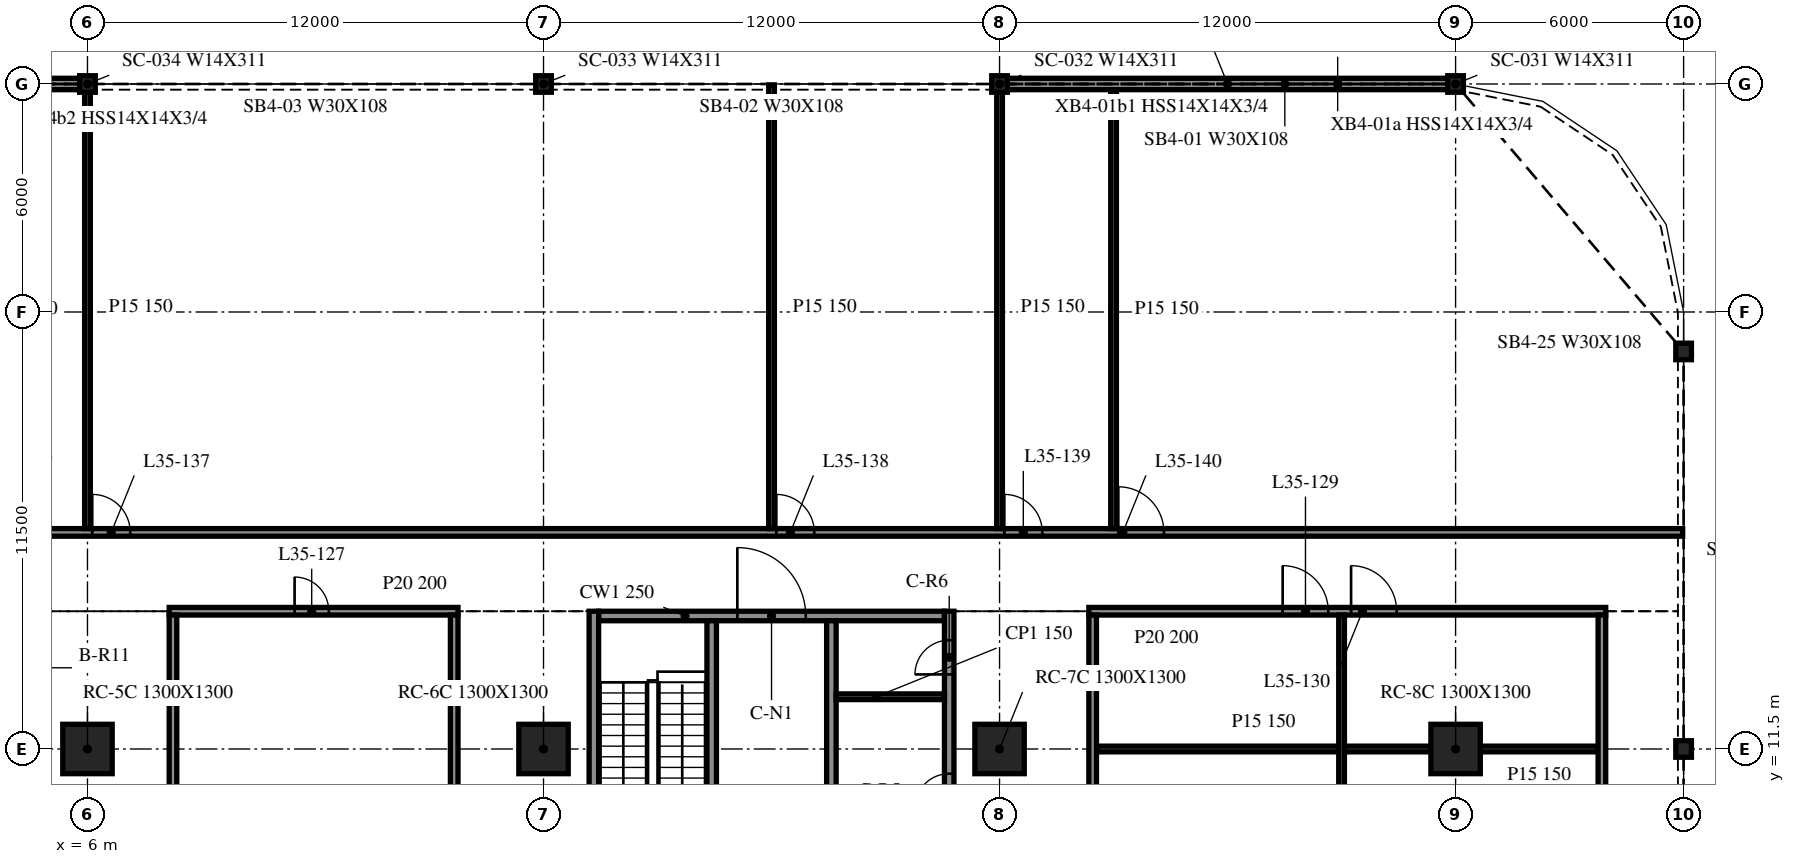
"""IFC4 building model, lengths in metres.
Left out: names, types, materials, properties, quantities, classifications, styles, units other than length and angle.
Written with IfcOpenShell. Run it as: python <this file> out.ifc"""

import sys

from ifc_helpers import new_model, si_unit, direction, frame, frame_2d, origin, origin_2d, place, context, subcontext, project, spatial, rectangle, i_section, extrude, element, fill, save


model = new_model("IFC4")
c1 = context("Model", 3, precision=1e-05, world=origin(), true_north=direction((0.0, 1.0)))
c2 = subcontext(c1, "Body", "Model", "MODEL_VIEW")
j1 = project(units=[si_unit("LENGTHUNIT", "METRE"), si_unit("PLANEANGLEUNIT", "RADIAN")], contexts=[c1])
p1 = place(None, origin())
s1 = spatial("IfcSite", under=j1, at=p1, CompositionType="ELEMENT")
p2 = place(p1, origin())
s2 = spatial("IfcBuilding", under=s1, at=p2, CompositionType="ELEMENT")
p3 = place(p2, frame((0.0, 0.0, 150.7)))
s3 = spatial("IfcBuildingStorey", under=s2, at=p3, CompositionType="ELEMENT", Elevation=150.7)
for number, where, z_axis, x_axis in (
    (1, (6.0, 11.5, -0.34), (0.0, 0.0, 1.0), (1.0, 0.0, 0.0)),
    (2, (18.0, 11.5, -0.34), (0.0, 0.0, 1.0), (1.0, 0.0, 0.0)),
    (3, (30.0, 11.5, -0.34), (0.0, 0.0, 1.0), (1.0, 0.0, 0.0)),
    (4, (42.0, 11.5, -0.34), (0.0, 0.0, 1.0), (1.0, 0.0, 0.0)),
):
    element("IfcColumn", number, at=place(p3, frame(where, z_axis=z_axis, x_axis=x_axis)), inside=s3, PredefinedType="COLUMN", context=c2, shape_type="SweptSolid", body=[
        extrude(rectangle(XDim=1.3, YDim=1.3, at=origin_2d()), origin(), (0.0, 0.0, 1.0), 3.89),
    ])
for number, where, z_axis, x_axis in (
    (5, (42.0, 29.0, -0.34), (0.0, 0.0, 1.0), (1.0, 0.0, 0.0)),
    (6, (30.0, 29.0, -0.34), (0.0, 0.0, 1.0), (1.0, 0.0, 0.0)),
    (7, (18.0, 29.0, -0.34), (0.0, 0.0, 1.0), (1.0, 0.0, 0.0)),
    (8, (6.0, 29.0, -0.34), (0.0, 0.0, 1.0), (1.0, 0.0, 0.0)),
    (9, (48.0, 11.5, -0.34), (0.0, 0.0, 1.0), (1.0, 0.0, 0.0)),
    (10, (48.0, 21.962, -0.34), (0.0, 0.0, 1.0), (1.0, 0.0, 0.0)),
):
    element("IfcColumn", number, at=place(p3, frame(where, z_axis=z_axis, x_axis=x_axis)), inside=s3, PredefinedType="COLUMN", context=c2, shape_type="SweptSolid", body=[
        extrude(i_section(OverallWidth=0.412, OverallDepth=0.434, WebThickness=0.036, FlangeThickness=0.057, at=origin_2d()), origin(), (0.0, 0.0, 1.0), 3.89),
    ])
for number, where, z_axis, x_axis in (
    (11, (41.982, 29.0, 0.0), (0.0, 0.0, 1.0), (-1.0, 0.0, 0.0)),
    (12, (5.982, 29.0, 0.0), (0.0, 0.0, 1.0), (-1.0, 0.0, 0.0)),
):
    element("IfcWall", number, at=place(p3, frame(where, z_axis=z_axis, x_axis=x_axis)), inside=s3, PredefinedType="NOTDEFINED", context=c2, shape_type="SweptSolid", body=[
        extrude(rectangle(XDim=11.964, YDim=0.3, at=frame_2d((5.982, 0.0))), origin(), (0.0, 0.0, 1.0), 3.55),
    ])
p4 = place(p3, frame((19.325, 15.125, 0.0), z_axis=(0.0, 0.0, 1.0), x_axis=(0.0, -1.0, 0.0)))
e13 = element("IfcWall", 13, at=p4, inside=s3, PredefinedType="SOLIDWALL", context=c2, shape_type="SweptSolid", body=[
    extrude(rectangle(XDim=24.25, YDim=0.25, at=frame_2d((12.125, 0.0))), origin(), (0.0, 0.0, 1.0), 3.55),
])
p5 = place(p3, frame((28.675, -9.125, 0.0), z_axis=(0.0, 0.0, 1.0), x_axis=(0.0, 1.0, 0.0)))
e14 = element("IfcWall", 14, at=p5, inside=s3, PredefinedType="SOLIDWALL", context=c2, shape_type="SweptSolid", body=[
    extrude(rectangle(XDim=24.25, YDim=0.25, at=frame_2d((12.125, 0.0))), origin(), (0.0, 0.0, 1.0), 3.55),
])
p6 = place(p5, frame((14.425, 0.0, 0.0)))
e15 = element("IfcOpeningElement", 15, at=p6, cuts=e14, PredefinedType="OPENING", context=c2, shape_type="SweptSolid", body=[
    extrude(rectangle(XDim=0.9, YDim=2.1, at=frame_2d((0.45, 1.05))), frame((0.0, 0.135, 0.0), z_axis=(0.0, -1.0, 0.0), x_axis=(1.0, 0.0, 0.0)), (0.0, 0.0, 1.0), 0.27),
])
p7 = place(p5, frame((19.075, 0.0, 0.0)))
e16 = element("IfcOpeningElement", 16, at=p7, cuts=e14, PredefinedType="OPENING", context=c2, shape_type="SweptSolid", body=[
    extrude(rectangle(XDim=0.9, YDim=2.1, at=frame_2d((0.45, 1.05))), frame((0.0, 0.135, 0.0), z_axis=(0.0, -1.0, 0.0), x_axis=(1.0, 0.0, 0.0)), (0.0, 0.0, 1.0), 0.27),
])
p8 = place(p5, frame((22.587, 0.0, 0.0)))
e17 = element("IfcOpeningElement", 17, at=p8, cuts=e14, PredefinedType="OPENING", context=c2, shape_type="SweptSolid", body=[
    extrude(rectangle(XDim=0.9, YDim=2.1, at=frame_2d((0.45, 1.05))), frame((0.0, 0.135, 0.0), z_axis=(0.0, -1.0, 0.0), x_axis=(1.0, 0.0, 0.0)), (0.0, 0.0, 1.0), 0.27),
])
p9 = place(p3, frame((19.45, 15.0, 0.0), z_axis=(0.0, 0.0, 1.0), x_axis=(1.0, 0.0, 0.0)))
e18 = element("IfcWall", 18, at=p9, inside=s3, PredefinedType="SOLIDWALL", context=c2, shape_type="SweptSolid", body=[
    extrude(rectangle(XDim=9.1, YDim=0.25, at=frame_2d((4.55, 0.0))), origin(), (0.0, 0.0, 1.0), 3.55),
])
p10 = place(p9, frame((3.65, 0.0, 0.0)))
e19 = element("IfcOpeningElement", 19, at=p10, cuts=e18, PredefinedType="OPENING", context=c2, shape_type="SweptSolid", body=[
    extrude(rectangle(XDim=1.8, YDim=2.1, at=frame_2d((0.9, 1.05))), frame((0.0, 0.135, 0.0), z_axis=(0.0, -1.0, 0.0), x_axis=(1.0, 0.0, 0.0)), (0.0, 0.0, 1.0), 0.27),
])
p11 = place(p3, frame((22.425, 14.875, 0.0), z_axis=(0.0, 0.0, 1.0), x_axis=(0.0, -1.0, 0.0)))
e20 = element("IfcWall", 20, at=p11, inside=s3, PredefinedType="SOLIDWALL", context=c2, shape_type="SweptSolid", body=[
    extrude(rectangle(XDim=6.25, YDim=0.25, at=frame_2d((3.125, 0.0))), origin(), (0.0, 0.0, 1.0), 3.55),
])
p12 = place(p11, frame((4.85, 0.0, 0.0)))
e21 = element("IfcOpeningElement", 21, at=p12, cuts=e20, PredefinedType="OPENING", context=c2, shape_type="SweptSolid", body=[
    extrude(rectangle(XDim=1.0, YDim=2.1, at=frame_2d((0.5, 1.05))), frame((0.0, 0.135, 0.0), z_axis=(0.0, -1.0, 0.0), x_axis=(1.0, 0.0, 0.0)), (0.0, 0.0, 1.0), 0.27),
])
p13 = place(p3, frame((25.575, 14.875, 0.0), z_axis=(0.0, 0.0, 1.0), x_axis=(0.0, -1.0, 0.0)))
e22 = element("IfcWall", 22, at=p13, inside=s3, PredefinedType="SOLIDWALL", context=c2, shape_type="SweptSolid", body=[
    extrude(rectangle(XDim=17.5, YDim=0.25, at=frame_2d((8.75, 0.0))), origin(), (0.0, 0.0, 1.0), 3.55),
])
p14 = place(p13, frame((15.45, 0.0, 0.0)))
e23 = element("IfcOpeningElement", 23, at=p14, cuts=e22, PredefinedType="OPENING", context=c2, shape_type="SweptSolid", body=[
    extrude(rectangle(XDim=1.1, YDim=2.1, at=frame_2d((0.55, 1.05))), frame((0.0, 0.135, 0.0), z_axis=(0.0, -1.0, 0.0), x_axis=(1.0, 0.0, 0.0)), (0.0, 0.0, 1.0), 0.27),
])
p15 = place(p13, frame((12.8, 0.0, 0.0)))
e24 = element("IfcOpeningElement", 24, at=p15, cuts=e22, PredefinedType="OPENING", context=c2, shape_type="SweptSolid", body=[
    extrude(rectangle(XDim=0.9, YDim=2.1, at=frame_2d((0.45, 1.05))), frame((0.0, 0.135, 0.0), z_axis=(0.0, -1.0, 0.0), x_axis=(1.0, 0.0, 0.0)), (0.0, 0.0, 1.0), 0.27),
])
p16 = place(p3, frame((25.7, 12.875, 0.0), z_axis=(0.0, 0.0, 1.0), x_axis=(1.0, 0.0, 0.0)))
e25 = element("IfcWall", 25, at=p16, inside=s3, PredefinedType="PARTITIONING", context=c2, shape_type="SweptSolid", body=[
    extrude(rectangle(XDim=2.85, YDim=0.15, at=frame_2d((1.425, 0.0))), origin(), (0.0, 0.0, 1.0), 3.55),
])
p17 = place(p3, frame((32.55, 11.5, 0.0), z_axis=(0.0, 0.0, 1.0), x_axis=(1.0, 0.0, 0.0)))
e26 = element("IfcWall", 26, at=p17, inside=s3, PredefinedType="PARTITIONING", context=c2, shape_type="SweptSolid", body=[
    extrude(rectangle(XDim=8.8, YDim=0.15, at=frame_2d((4.4, 0.0))), origin(), (0.0, 0.0, 1.0), 3.55),
])
p18 = place(p3, frame((42.65, 11.5, 0.0), z_axis=(0.0, 0.0, 1.0), x_axis=(1.0, 0.0, 0.0)))
e27 = element("IfcWall", 27, at=p18, inside=s3, PredefinedType="PARTITIONING", context=c2, shape_type="SweptSolid", body=[
    extrude(rectangle(XDim=3.1, YDim=0.15, at=frame_2d((1.55, 0.0))), origin(), (0.0, 0.0, 1.0), 3.55),
])
p19 = place(p3, frame((8.15, 15.125, 0.0), z_axis=(0.0, 0.0, 1.0), x_axis=(1.0, 0.0, 0.0)))
e28 = element("IfcWall", 28, at=p19, inside=s3, PredefinedType="PARTITIONING", context=c2, shape_type="SweptSolid", body=[
    extrude(rectangle(XDim=7.6, YDim=0.2, at=frame_2d((3.8, 0.0))), origin(), (0.0, 0.0, 1.0), 3.55),
])
p20 = place(p19, frame((3.3, 0.0, 0.0)))
e29 = element("IfcOpeningElement", 29, at=p20, cuts=e28, PredefinedType="OPENING", context=c2, shape_type="SweptSolid", body=[
    extrude(rectangle(XDim=0.9, YDim=2.1, at=frame_2d((0.45, 1.05))), frame((0.0, 0.11, 0.0), z_axis=(0.0, -1.0, 0.0), x_axis=(1.0, 0.0, 0.0)), (0.0, 0.0, 1.0), 0.22),
])
p21 = place(p3, frame((32.35, 15.125, 0.0), z_axis=(0.0, 0.0, 1.0), x_axis=(1.0, 0.0, 0.0)))
e30 = element("IfcWall", 30, at=p21, inside=s3, PredefinedType="PARTITIONING", context=c2, shape_type="SweptSolid", body=[
    extrude(rectangle(XDim=13.6, YDim=0.2, at=frame_2d((6.8, 0.0))), origin(), (0.0, 0.0, 1.0), 3.55),
])
p22 = place(p21, frame((5.1, 0.0, 0.0)))
e31 = element("IfcOpeningElement", 31, at=p22, cuts=e30, PredefinedType="OPENING", context=c2, shape_type="SweptSolid", body=[
    extrude(rectangle(XDim=1.2, YDim=2.1, at=frame_2d((0.6, 1.05))), frame((0.0, 0.11, 0.0), z_axis=(0.0, -1.0, 0.0), x_axis=(1.0, 0.0, 0.0)), (0.0, 0.0, 1.0), 0.22),
])
p23 = place(p21, frame((6.9, 0.0, 0.0)))
e32 = element("IfcOpeningElement", 32, at=p23, cuts=e30, PredefinedType="OPENING", context=c2, shape_type="SweptSolid", body=[
    extrude(rectangle(XDim=1.2, YDim=2.1, at=frame_2d((0.6, 1.05))), frame((0.0, 0.11, 0.0), z_axis=(0.0, -1.0, 0.0), x_axis=(1.0, 0.0, 0.0)), (0.0, 0.0, 1.0), 0.22),
])
p24 = place(p3, frame((-47.975, 17.2, 0.0), z_axis=(0.0, 0.0, 1.0), x_axis=(1.0, 0.0, 0.0)))
e33 = element("IfcWall", 33, at=p24, inside=s3, PredefinedType="PARTITIONING", context=c2, shape_type="SweptSolid", body=[
    extrude(rectangle(XDim=95.95, YDim=0.2, at=frame_2d((47.975, 0.0))), origin(), (0.0, 0.0, 1.0), 3.55),
])
p25 = place(p24, frame((16.5, 0.0, 0.0)))
e34 = element("IfcOpeningElement", 34, at=p25, cuts=e33, PredefinedType="OPENING", context=c2, shape_type="SweptSolid", body=[
    extrude(rectangle(XDim=1.0, YDim=2.1, at=frame_2d((0.5, 1.05))), frame((0.0, 0.11, 0.0), z_axis=(0.0, -1.0, 0.0), x_axis=(1.0, 0.0, 0.0)), (0.0, 0.0, 1.0), 0.22),
])
p26 = place(p24, frame((22.5, 0.0, 0.0)))
e35 = element("IfcOpeningElement", 35, at=p26, cuts=e33, PredefinedType="OPENING", context=c2, shape_type="SweptSolid", body=[
    extrude(rectangle(XDim=1.0, YDim=2.1, at=frame_2d((0.5, 1.05))), frame((0.0, 0.11, 0.0), z_axis=(0.0, -1.0, 0.0), x_axis=(1.0, 0.0, 0.0)), (0.0, 0.0, 1.0), 0.22),
])
p27 = place(p24, frame((25.5, 0.0, 0.0)))
e36 = element("IfcOpeningElement", 36, at=p27, cuts=e33, PredefinedType="OPENING", context=c2, shape_type="SweptSolid", body=[
    extrude(rectangle(XDim=1.0, YDim=2.1, at=frame_2d((0.5, 1.05))), frame((0.0, 0.11, 0.0), z_axis=(0.0, -1.0, 0.0), x_axis=(1.0, 0.0, 0.0)), (0.0, 0.0, 1.0), 0.22),
])
p28 = place(p24, frame((43.3, 0.0, 0.0)))
e37 = element("IfcOpeningElement", 37, at=p28, cuts=e33, PredefinedType="OPENING", context=c2, shape_type="SweptSolid", body=[
    extrude(rectangle(XDim=1.2, YDim=2.1, at=frame_2d((0.6, 1.05))), frame((0.0, 0.11, 0.0), z_axis=(0.0, -1.0, 0.0), x_axis=(1.0, 0.0, 0.0)), (0.0, 0.0, 1.0), 0.22),
])
p29 = place(p24, frame((47.3, 0.0, 0.0)))
e38 = element("IfcOpeningElement", 38, at=p29, cuts=e33, PredefinedType="OPENING", context=c2, shape_type="SweptSolid", body=[
    extrude(rectangle(XDim=1.2, YDim=2.1, at=frame_2d((0.6, 1.05))), frame((0.0, 0.11, 0.0), z_axis=(0.0, -1.0, 0.0), x_axis=(1.0, 0.0, 0.0)), (0.0, 0.0, 1.0), 0.22),
])
p30 = place(p24, frame((51.1, 0.0, 0.0)))
e39 = element("IfcOpeningElement", 39, at=p30, cuts=e33, PredefinedType="OPENING", context=c2, shape_type="SweptSolid", body=[
    extrude(rectangle(XDim=1.2, YDim=2.1, at=frame_2d((0.6, 1.05))), frame((0.0, 0.11, 0.0), z_axis=(0.0, -1.0, 0.0), x_axis=(1.0, 0.0, 0.0)), (0.0, 0.0, 1.0), 0.22),
])
p31 = place(p24, frame((54.1, 0.0, 0.0)))
e40 = element("IfcOpeningElement", 40, at=p31, cuts=e33, PredefinedType="OPENING", context=c2, shape_type="SweptSolid", body=[
    extrude(rectangle(XDim=1.0, YDim=2.1, at=frame_2d((0.5, 1.05))), frame((0.0, 0.11, 0.0), z_axis=(0.0, -1.0, 0.0), x_axis=(1.0, 0.0, 0.0)), (0.0, 0.0, 1.0), 0.22),
])
p32 = place(p24, frame((72.1, 0.0, 0.0)))
e41 = element("IfcOpeningElement", 41, at=p32, cuts=e33, PredefinedType="OPENING", context=c2, shape_type="SweptSolid", body=[
    extrude(rectangle(XDim=1.0, YDim=2.1, at=frame_2d((0.5, 1.05))), frame((0.0, 0.11, 0.0), z_axis=(0.0, -1.0, 0.0), x_axis=(1.0, 0.0, 0.0)), (0.0, 0.0, 1.0), 0.22),
])
p33 = place(p24, frame((78.1, 0.0, 0.0)))
e42 = element("IfcOpeningElement", 42, at=p33, cuts=e33, PredefinedType="OPENING", context=c2, shape_type="SweptSolid", body=[
    extrude(rectangle(XDim=1.0, YDim=2.1, at=frame_2d((0.5, 1.05))), frame((0.0, 0.11, 0.0), z_axis=(0.0, -1.0, 0.0), x_axis=(1.0, 0.0, 0.0)), (0.0, 0.0, 1.0), 0.22),
])
p34 = place(p24, frame((81.1, 0.0, 0.0)))
e43 = element("IfcOpeningElement", 43, at=p34, cuts=e33, PredefinedType="OPENING", context=c2, shape_type="SweptSolid", body=[
    extrude(rectangle(XDim=1.2, YDim=2.1, at=frame_2d((0.6, 1.05))), frame((0.0, 0.11, 0.0), z_axis=(0.0, -1.0, 0.0), x_axis=(1.0, 0.0, 0.0)), (0.0, 0.0, 1.0), 0.22),
])
p35 = place(p3, frame((6.0, 17.3, 0.0), z_axis=(0.0, 0.0, 1.0), x_axis=(0.0, 1.0, 0.0)))
e44 = element("IfcWall", 44, at=p35, inside=s3, PredefinedType="PARTITIONING", context=c2, shape_type="SweptSolid", body=[
    extrude(rectangle(XDim=11.675, YDim=0.15, at=frame_2d((5.837, 0.0))), origin(), (0.0, 0.0, 1.0), 2.551),
])
for number, where, z_axis, x_axis in (
    (45, (8.25, -9.025, 0.0), (0.0, 0.0, 1.0), (0.0, 1.0, 0.0)),
    (46, (15.65, -9.025, 0.0), (0.0, 0.0, 1.0), (0.0, 1.0, 0.0)),
):
    element("IfcWall", number, at=place(p3, frame(where, z_axis=z_axis, x_axis=x_axis)), inside=s3, PredefinedType="PARTITIONING", context=c2, shape_type="SweptSolid", body=[
        extrude(rectangle(XDim=24.05, YDim=0.2, at=frame_2d((12.025, 0.0))), origin(), (0.0, 0.0, 1.0), 3.55),
    ])
p36 = place(p3, frame((24.0, 17.3, 0.0), z_axis=(0.0, 0.0, 1.0), x_axis=(0.0, 1.0, 0.0)))
e47 = element("IfcWall", 47, at=p36, inside=s3, PredefinedType="PARTITIONING", context=c2, shape_type="SweptSolid", body=[
    extrude(rectangle(XDim=11.675, YDim=0.15, at=frame_2d((5.837, 0.0))), origin(), (0.0, 0.0, 1.0), 3.55),
])
p37 = place(p3, frame((30.0, 17.3, 0.0), z_axis=(0.0, 0.0, 1.0), x_axis=(0.0, 1.0, 0.0)))
e48 = element("IfcWall", 48, at=p37, inside=s3, PredefinedType="PARTITIONING", context=c2, shape_type="SweptSolid", body=[
    extrude(rectangle(XDim=11.675, YDim=0.15, at=frame_2d((5.837, 0.0))), origin(), (0.0, 0.0, 1.0), 2.551),
])
p38 = place(p3, frame((32.45, -9.025, 0.0), z_axis=(0.0, 0.0, 1.0), x_axis=(0.0, 1.0, 0.0)))
e49 = element("IfcWall", 49, at=p38, inside=s3, PredefinedType="PARTITIONING", context=c2, shape_type="SweptSolid", body=[
    extrude(rectangle(XDim=24.05, YDim=0.2, at=frame_2d((12.025, 0.0))), origin(), (0.0, 0.0, 1.0), 3.55),
])
p39 = place(p38, frame((11.5, 0.0, 0.0)))
e50 = element("IfcOpeningElement", 50, at=p39, cuts=e49, PredefinedType="OPENING", context=c2, shape_type="SweptSolid", body=[
    extrude(rectangle(XDim=1.2, YDim=2.1, at=frame_2d((0.6, 1.05))), frame((0.0, 0.11, 0.0), z_axis=(0.0, -1.0, 0.0), x_axis=(1.0, 0.0, 0.0)), (0.0, 0.0, 1.0), 0.22),
])
p40 = place(p3, frame((33.0, 17.3, 0.0), z_axis=(0.0, 0.0, 1.0), x_axis=(0.0, 1.0, 0.0)))
e51 = element("IfcWall", 51, at=p40, inside=s3, PredefinedType="PARTITIONING", context=c2, shape_type="SweptSolid", body=[
    extrude(rectangle(XDim=11.55, YDim=0.15, at=frame_2d((5.775, 0.0))), origin(), (0.0, 0.0, 1.0), 3.55),
])
p41 = place(p3, frame((39.0, -9.025, 0.0), z_axis=(0.0, 0.0, 1.0), x_axis=(0.0, 1.0, 0.0)))
e52 = element("IfcWall", 52, at=p41, inside=s3, PredefinedType="PARTITIONING", context=c2, shape_type="SweptSolid", body=[
    extrude(rectangle(XDim=24.05, YDim=0.15, at=frame_2d((12.025, 0.0))), origin(), (0.0, 0.0, 1.0), 3.55),
])
p42 = place(p3, frame((45.85, -9.025, 0.0), z_axis=(0.0, 0.0, 1.0), x_axis=(0.0, 1.0, 0.0)))
e53 = element("IfcWall", 53, at=p42, inside=s3, PredefinedType="PARTITIONING", context=c2, shape_type="SweptSolid", body=[
    extrude(rectangle(XDim=24.05, YDim=0.2, at=frame_2d((12.025, 0.0))), origin(), (0.0, 0.0, 1.0), 3.55),
])
p43 = place(p42, frame((11.5, 0.0, 0.0)))
e54 = element("IfcOpeningElement", 54, at=p43, cuts=e53, PredefinedType="OPENING", context=c2, shape_type="SweptSolid", body=[
    extrude(rectangle(XDim=1.2, YDim=2.1, at=frame_2d((0.6, 1.05))), frame((0.0, 0.11, 0.0), z_axis=(0.0, -1.0, 0.0), x_axis=(1.0, 0.0, 0.0)), (0.0, 0.0, 1.0), 0.22),
])
p44 = place(p10, origin())
e55 = element("IfcDoor", 55, at=p44, inside=s3, OperationType="DOUBLE_DOOR_SINGLE_SWING", PredefinedType="DOOR", context=c2, shape_type="SweptSolid", body=[
    extrude(rectangle(XDim=1.8, YDim=2.1, at=frame_2d((0.9, 1.05))), frame((0.0, 0.025, 0.0), z_axis=(0.0, -1.0, 0.0), x_axis=(1.0, 0.0, 0.0)), (0.0, 0.0, 1.0), 0.05),
])
fill(e19, e55)
p45 = place(p7, origin())
e56 = element("IfcDoor", 56, at=p45, inside=s3, OperationType="SINGLE_SWING_LEFT", PredefinedType="DOOR", context=c2, shape_type="SweptSolid", body=[
    extrude(rectangle(XDim=0.9, YDim=2.1, at=frame_2d((0.45, 1.05))), frame((0.0, 0.025, 0.0), z_axis=(0.0, -1.0, 0.0), x_axis=(1.0, 0.0, 0.0)), (0.0, 0.0, 1.0), 0.05),
])
fill(e16, e56)
p46 = place(p8, origin())
e57 = element("IfcDoor", 57, at=p46, inside=s3, OperationType="SINGLE_SWING_RIGHT", PredefinedType="DOOR", context=c2, shape_type="SweptSolid", body=[
    extrude(rectangle(XDim=0.9, YDim=2.1, at=frame_2d((0.45, 1.05))), frame((0.0, 0.025, 0.0), z_axis=(0.0, -1.0, 0.0), x_axis=(1.0, 0.0, 0.0)), (0.0, 0.0, 1.0), 0.05),
])
fill(e17, e57)
p47 = place(p20, origin())
e58 = element("IfcDoor", 58, at=p47, inside=s3, OperationType="SINGLE_SWING_RIGHT", PredefinedType="DOOR", context=c2, shape_type="SweptSolid", body=[
    extrude(rectangle(XDim=0.9, YDim=2.1, at=frame_2d((0.45, 1.05))), frame((0.0, 0.025, 0.0), z_axis=(0.0, -1.0, 0.0), x_axis=(1.0, 0.0, 0.0)), (0.0, 0.0, 1.0), 0.05),
])
fill(e29, e58)
p48 = place(p22, origin())
e59 = element("IfcDoor", 59, at=p48, inside=s3, OperationType="SINGLE_SWING_RIGHT", PredefinedType="DOOR", context=c2, shape_type="SweptSolid", body=[
    extrude(rectangle(XDim=1.2, YDim=2.1, at=frame_2d((0.6, 1.05))), frame((0.0, 0.025, 0.0), z_axis=(0.0, -1.0, 0.0), x_axis=(1.0, 0.0, 0.0)), (0.0, 0.0, 1.0), 0.05),
])
fill(e31, e59)
p49 = place(p23, origin())
e60 = element("IfcDoor", 60, at=p49, inside=s3, OperationType="SINGLE_SWING_LEFT", PredefinedType="DOOR", context=c2, shape_type="SweptSolid", body=[
    extrude(rectangle(XDim=1.2, YDim=2.1, at=frame_2d((0.6, 1.05))), frame((0.0, 0.025, 0.0), z_axis=(0.0, -1.0, 0.0), x_axis=(1.0, 0.0, 0.0)), (0.0, 0.0, 1.0), 0.05),
])
fill(e32, e60)
p50 = place(p31, origin())
e61 = element("IfcDoor", 61, at=p50, inside=s3, OperationType="SINGLE_SWING_RIGHT", PredefinedType="DOOR", context=c2, shape_type="SweptSolid", body=[
    extrude(rectangle(XDim=1.0, YDim=2.1, at=frame_2d((0.5, 1.05))), frame((0.0, 0.025, 0.0), z_axis=(0.0, -1.0, 0.0), x_axis=(1.0, 0.0, 0.0)), (0.0, 0.0, 1.0), 0.05),
])
fill(e40, e61)
p51 = place(p32, origin())
e62 = element("IfcDoor", 62, at=p51, inside=s3, OperationType="SINGLE_SWING_RIGHT", PredefinedType="DOOR", context=c2, shape_type="SweptSolid", body=[
    extrude(rectangle(XDim=1.0, YDim=2.1, at=frame_2d((0.5, 1.05))), frame((0.0, 0.025, 0.0), z_axis=(0.0, -1.0, 0.0), x_axis=(1.0, 0.0, 0.0)), (0.0, 0.0, 1.0), 0.05),
])
fill(e41, e62)
p52 = place(p33, origin())
e63 = element("IfcDoor", 63, at=p52, inside=s3, OperationType="SINGLE_SWING_RIGHT", PredefinedType="DOOR", context=c2, shape_type="SweptSolid", body=[
    extrude(rectangle(XDim=1.0, YDim=2.1, at=frame_2d((0.5, 1.05))), frame((0.0, 0.025, 0.0), z_axis=(0.0, -1.0, 0.0), x_axis=(1.0, 0.0, 0.0)), (0.0, 0.0, 1.0), 0.05),
])
fill(e42, e63)
p53 = place(p34, origin())
e64 = element("IfcDoor", 64, at=p53, inside=s3, OperationType="SINGLE_SWING_RIGHT", PredefinedType="DOOR", context=c2, shape_type="SweptSolid", body=[
    extrude(rectangle(XDim=1.2, YDim=2.1, at=frame_2d((0.6, 1.05))), frame((0.0, 0.025, 0.0), z_axis=(0.0, -1.0, 0.0), x_axis=(1.0, 0.0, 0.0)), (0.0, 0.0, 1.0), 0.05),
])
fill(e43, e64)
save(model, sys.argv[1])
